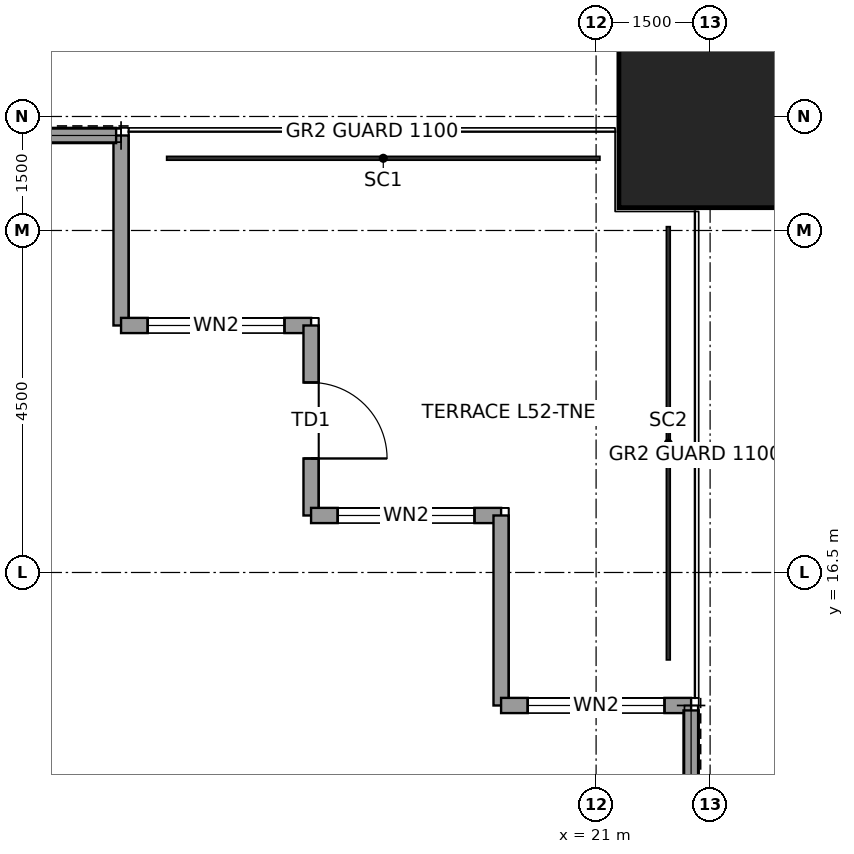
"""IFC4 building model, lengths in metres.
Left out: names, types, materials, properties, quantities, classifications, styles, units other than length and angle.
Written with IfcOpenShell. Run it as: python <this file> out.ifc"""

import sys

from ifc_helpers import new_model, si_unit, direction, frame, frame_2d, origin, origin_2d, place, context, subcontext, project, spatial, rectangle, hollow_rectangle, extrude, element, fill, save


model = new_model("IFC4")
c1 = context("Model", 3, precision=1e-05, world=origin(), true_north=direction((0.0, 1.0)))
c2 = subcontext(c1, "Body", "Model", "MODEL_VIEW")
j1 = project(units=[si_unit("LENGTHUNIT", "METRE"), si_unit("PLANEANGLEUNIT", "RADIAN")], contexts=[c1])
p1 = place(None, origin())
s1 = spatial("IfcSite", under=j1, at=p1, CompositionType="ELEMENT")
p2 = place(p1, origin())
s2 = spatial("IfcBuilding", under=s1, at=p2, CompositionType="ELEMENT")
p3 = place(p2, frame((0.0, 0.0, 241.9)))
s3 = spatial("IfcBuildingStorey", under=s2, at=p3, CompositionType="ELEMENT", Elevation=241.9)
p4 = place(p3, frame((22.5, 22.5, 0.0), z_axis=(0.0, 0.0, 1.0), x_axis=(1.0, 0.0, 0.0)))
e1 = element("IfcColumn", 1, at=p4, inside=s3, PredefinedType="COLUMN", context=c2, shape_type="SweptSolid", body=[
    extrude(hollow_rectangle(XDim=2.4, YDim=2.4, WallThickness=0.12, at=origin_2d()), origin(), (0.0, 0.0, 1.0), 4.0),
])
p5 = place(p3, frame((14.75, 22.25, 0.0), z_axis=(0.0, 0.0, 1.0), x_axis=(0.0, -1.0, 0.0)))
e2 = element("IfcWall", 2, at=p5, inside=s3, PredefinedType="SOLIDWALL", context=c2, shape_type="SweptSolid", body=[
    extrude(rectangle(XDim=2.5, YDim=0.2, at=frame_2d((1.25, 0.0))), origin(), (0.0, 0.0, 1.0), 3.85),
])
p6 = place(p3, frame((14.75, 19.75, 0.0), z_axis=(0.0, 0.0, 1.0), x_axis=(1.0, 0.0, 0.0)))
e3 = element("IfcWall", 3, at=p6, inside=s3, PredefinedType="SOLIDWALL", context=c2, shape_type="SweptSolid", body=[
    extrude(rectangle(XDim=2.5, YDim=0.2, at=frame_2d((1.25, 0.0))), origin(), (0.0, 0.0, 1.0), 3.85),
])
p7 = place(p6, frame((0.35, 0.0, 0.3)))
e4 = element("IfcOpeningElement", 4, at=p7, cuts=e3, PredefinedType="OPENING", context=c2, shape_type="SweptSolid", body=[
    extrude(rectangle(XDim=1.8, YDim=2.4, at=frame_2d((0.9, 1.2))), frame((0.0, 0.11, 0.0), z_axis=(0.0, -1.0, 0.0), x_axis=(1.0, 0.0, 0.0)), (0.0, 0.0, 1.0), 0.22),
])
p8 = place(p3, frame((17.25, 19.75, 0.0), z_axis=(0.0, 0.0, 1.0), x_axis=(0.0, -1.0, 0.0)))
e5 = element("IfcWall", 5, at=p8, inside=s3, PredefinedType="SOLIDWALL", context=c2, shape_type="SweptSolid", body=[
    extrude(rectangle(XDim=2.5, YDim=0.2, at=frame_2d((1.25, 0.0))), origin(), (0.0, 0.0, 1.0), 3.85),
])
p9 = place(p8, frame((0.75, 0.0, 0.0)))
e6 = element("IfcOpeningElement", 6, at=p9, cuts=e5, PredefinedType="OPENING", context=c2, shape_type="SweptSolid", body=[
    extrude(rectangle(XDim=1.0, YDim=2.4, at=frame_2d((0.5, 1.2))), frame((0.0, 0.11, 0.0), z_axis=(0.0, -1.0, 0.0), x_axis=(1.0, 0.0, 0.0)), (0.0, 0.0, 1.0), 0.22),
])
p10 = place(p3, frame((17.25, 17.25, 0.0), z_axis=(0.0, 0.0, 1.0), x_axis=(1.0, 0.0, 0.0)))
e7 = element("IfcWall", 7, at=p10, inside=s3, PredefinedType="SOLIDWALL", context=c2, shape_type="SweptSolid", body=[
    extrude(rectangle(XDim=2.5, YDim=0.2, at=frame_2d((1.25, 0.0))), origin(), (0.0, 0.0, 1.0), 3.85),
])
p11 = place(p10, frame((0.35, 0.0, 0.3)))
e8 = element("IfcOpeningElement", 8, at=p11, cuts=e7, PredefinedType="OPENING", context=c2, shape_type="SweptSolid", body=[
    extrude(rectangle(XDim=1.8, YDim=2.4, at=frame_2d((0.9, 1.2))), frame((0.0, 0.11, 0.0), z_axis=(0.0, -1.0, 0.0), x_axis=(1.0, 0.0, 0.0)), (0.0, 0.0, 1.0), 0.22),
])
p12 = place(p3, frame((19.75, 17.25, 0.0), z_axis=(0.0, 0.0, 1.0), x_axis=(0.0, -1.0, 0.0)))
e9 = element("IfcWall", 9, at=p12, inside=s3, PredefinedType="SOLIDWALL", context=c2, shape_type="SweptSolid", body=[
    extrude(rectangle(XDim=2.5, YDim=0.2, at=frame_2d((1.25, 0.0))), origin(), (0.0, 0.0, 1.0), 3.85),
])
p13 = place(p3, frame((19.75, 14.75, 0.0), z_axis=(0.0, 0.0, 1.0), x_axis=(1.0, 0.0, 0.0)))
e10 = element("IfcWall", 10, at=p13, inside=s3, PredefinedType="SOLIDWALL", context=c2, shape_type="SweptSolid", body=[
    extrude(rectangle(XDim=2.5, YDim=0.2, at=frame_2d((1.25, 0.0))), origin(), (0.0, 0.0, 1.0), 3.85),
])
p14 = place(p13, frame((0.35, 0.0, 0.3)))
e11 = element("IfcOpeningElement", 11, at=p14, cuts=e10, PredefinedType="OPENING", context=c2, shape_type="SweptSolid", body=[
    extrude(rectangle(XDim=1.8, YDim=2.4, at=frame_2d((0.9, 1.2))), frame((0.0, 0.11, 0.0), z_axis=(0.0, -1.0, 0.0), x_axis=(1.0, 0.0, 0.0)), (0.0, 0.0, 1.0), 0.22),
])
for number, where, z_axis, x_axis in (
    (12, (12.366, 22.25, 0.0), (0.0, 0.0, 1.0), (1.0, 0.0, 0.0)),
    (13, (22.25, 14.685, 0.0), (0.0, 0.0, 1.0), (0.0, -1.0, 0.0)),
):
    element("IfcWall", number, at=place(p3, frame(where, z_axis=z_axis, x_axis=x_axis)), inside=s3, PredefinedType="SOLIDWALL", context=c2, shape_type="SweptSolid", body=[
        extrude(rectangle(XDim=2.319, YDim=0.2, at=frame_2d((1.16, 0.0))), origin(), (0.0, 0.0, 1.0), 3.85),
    ])
p15 = place(p7, origin())
e14 = element("IfcWindow", 14, at=p15, inside=s3, PartitioningType="SINGLE_PANEL", PredefinedType="WINDOW", context=c2, shape_type="SweptSolid", body=[
    extrude(rectangle(XDim=1.8, YDim=2.4, at=frame_2d((0.9, 1.2))), frame((0.0, 0.03, 0.0), z_axis=(0.0, -1.0, 0.0), x_axis=(1.0, 0.0, 0.0)), (0.0, 0.0, 1.0), 0.06),
])
fill(e4, e14)
p16 = place(p9, origin())
e15 = element("IfcDoor", 15, at=p16, inside=s3, OperationType="SINGLE_SWING_RIGHT", PredefinedType="DOOR", context=c2, shape_type="SweptSolid", body=[
    extrude(rectangle(XDim=1.0, YDim=2.4, at=frame_2d((0.5, 1.2))), frame((0.0, 0.025, 0.0), z_axis=(0.0, -1.0, 0.0), x_axis=(1.0, 0.0, 0.0)), (0.0, 0.0, 1.0), 0.05),
])
fill(e6, e15)
p17 = place(p11, origin())
e16 = element("IfcWindow", 16, at=p17, inside=s3, PartitioningType="SINGLE_PANEL", PredefinedType="WINDOW", context=c2, shape_type="SweptSolid", body=[
    extrude(rectangle(XDim=1.8, YDim=2.4, at=frame_2d((0.9, 1.2))), frame((0.0, 0.03, 0.0), z_axis=(0.0, -1.0, 0.0), x_axis=(1.0, 0.0, 0.0)), (0.0, 0.0, 1.0), 0.06),
])
fill(e8, e16)
p18 = place(p14, origin())
e17 = element("IfcWindow", 17, at=p18, inside=s3, PartitioningType="SINGLE_PANEL", PredefinedType="WINDOW", context=c2, shape_type="SweptSolid", body=[
    extrude(rectangle(XDim=1.8, YDim=2.4, at=frame_2d((0.9, 1.2))), frame((0.0, 0.03, 0.0), z_axis=(0.0, -1.0, 0.0), x_axis=(1.0, 0.0, 0.0)), (0.0, 0.0, 1.0), 0.06),
])
fill(e11, e17)
save(model, sys.argv[1])
